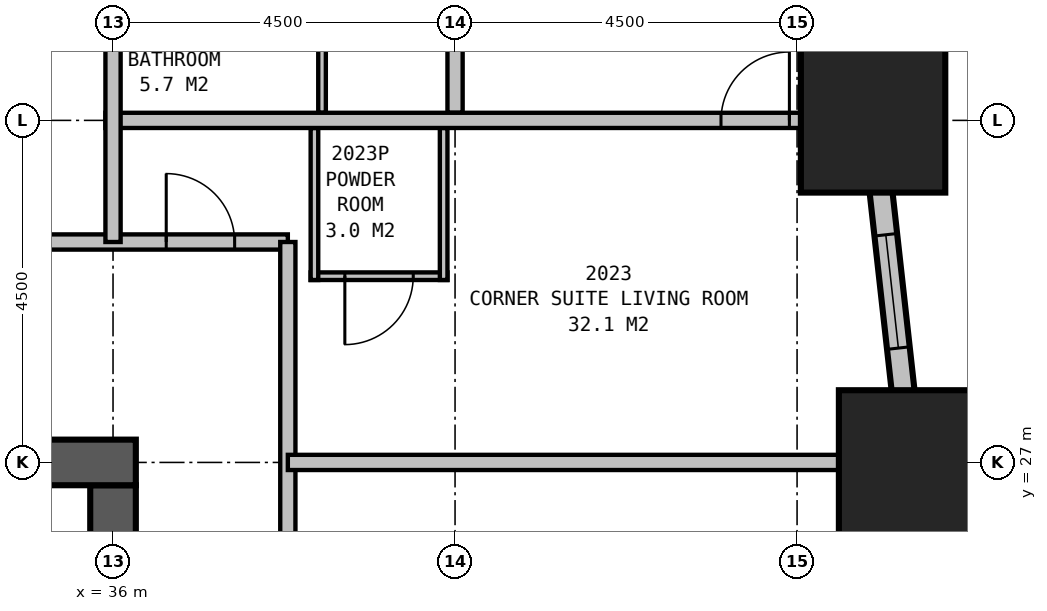
"""IFC4 building model, lengths in metres.
Left out: names, types, materials, properties, quantities, classifications, styles, units other than length and angle.
Written with IfcOpenShell. Run it as: python <this file> out.ifc"""

import sys

from ifc_helpers import new_model, si_unit, direction, frame, frame_2d, origin, origin_2d, place, context, subcontext, project, spatial, rectangle, extrude, element, fill, save


model = new_model("IFC4")
c1 = context("Model", 3, precision=1e-05, world=origin(), true_north=direction((0.0, 1.0)))
c2 = subcontext(c1, "Body", "Model", "MODEL_VIEW")
j1 = project(units=[si_unit("LENGTHUNIT", "METRE"), si_unit("PLANEANGLEUNIT", "RADIAN")], contexts=[c1])
p1 = place(None, origin())
s1 = spatial("IfcSite", under=j1, at=p1, CompositionType="ELEMENT")
p2 = place(p1, origin())
s2 = spatial("IfcBuilding", under=s1, at=p2, CompositionType="ELEMENT")
p3 = place(p2, frame((0.0, 0.0, 82.2)))
s3 = spatial("IfcBuildingStorey", under=s2, at=p3, CompositionType="ELEMENT", Elevation=82.2)
for number, where, z_axis, x_axis in (
    (1, (46.5, 27.0, 0.0), (0.0, 0.0, 1.0), (1.0, 0.0, 0.0)),
    (2, (46.0, 31.5, 0.0), (0.0, 0.0, 1.0), (1.0, 0.0, 0.0)),
):
    element("IfcColumn", number, at=place(p3, frame(where, z_axis=z_axis, x_axis=x_axis)), inside=s3, PredefinedType="COLUMN", context=c2, shape_type="SweptSolid", body=[
        extrude(rectangle(XDim=1.9, YDim=1.9, at=origin_2d()), origin(), (0.0, 0.0, 1.0), 3.5),
    ])
p4 = place(p3, frame((36.3, 27.0, 0.0), z_axis=(0.0, 0.0, 1.0), x_axis=(-1.0, 0.0, 0.0)))
e3 = element("IfcWall", 3, at=p4, inside=s3, PredefinedType="SHEAR", context=c2, shape_type="SweptSolid", body=[
    extrude(rectangle(XDim=23.1, YDim=0.6, at=frame_2d((11.55, 0.0))), origin(), (0.0, 0.0, 1.0), 3.5),
])
p5 = place(p4, frame((17.05, 0.0, 0.0)))
e4 = element("IfcOpeningElement", 4, at=p5, cuts=e3, PredefinedType="OPENING", context=c2, shape_type="SweptSolid", body=[
    extrude(rectangle(XDim=1.0, YDim=2.1, at=frame_2d((0.5, 1.05))), frame((0.0, 0.31, 0.0), z_axis=(0.0, -1.0, 0.0), x_axis=(1.0, 0.0, 0.0)), (0.0, 0.0, 1.0), 0.62),
])
p6 = place(p4, frame((12.05, 0.0, 0.0)))
e5 = element("IfcOpeningElement", 5, at=p6, cuts=e3, PredefinedType="OPENING", context=c2, shape_type="SweptSolid", body=[
    extrude(rectangle(XDim=1.0, YDim=2.1, at=frame_2d((0.5, 1.05))), frame((0.0, 0.31, 0.0), z_axis=(0.0, -1.0, 0.0), x_axis=(1.0, 0.0, 0.0)), (0.0, 0.0, 1.0), 0.62),
])
p7 = place(p4, frame((7.05, 0.0, 0.0)))
e6 = element("IfcOpeningElement", 6, at=p7, cuts=e3, PredefinedType="OPENING", context=c2, shape_type="SweptSolid", body=[
    extrude(rectangle(XDim=1.0, YDim=2.1, at=frame_2d((0.5, 1.05))), frame((0.0, 0.31, 0.0), z_axis=(0.0, -1.0, 0.0), x_axis=(1.0, 0.0, 0.0)), (0.0, 0.0, 1.0), 0.62),
])
p8 = place(p3, frame((36.0, 20.0, 0.0), z_axis=(0.0, 0.0, 1.0), x_axis=(0.0, 1.0, 0.0)))
e7 = element("IfcWall", 7, at=p8, inside=s3, PredefinedType="SHEAR", context=c2, shape_type="SweptSolid", body=[
    extrude(rectangle(XDim=6.7, YDim=0.6, at=frame_2d((3.35, 0.0))), origin(), (0.0, 0.0, 1.0), 3.5),
])
p9 = place(p3, frame((49.017, 4.351, 0.0), z_axis=(0.0, 0.0, 1.0), x_axis=(-0.110433201132, 0.993883548555, 0.0)))
e8 = element("IfcWall", 8, at=p9, inside=s3, PredefinedType="STANDARD", context=c2, shape_type="SweptSolid", body=[
    extrude(rectangle(XDim=31.994, YDim=0.3, at=frame_2d((15.997, 0.0))), origin(), (0.0, 0.0, 1.0), 2.1),
])
p10 = place(p9, frame((1.664, 0.0, 0.5)))
e9 = element("IfcOpeningElement", 9, at=p10, cuts=e8, PredefinedType="OPENING", context=c2, shape_type="SweptSolid", body=[
    extrude(rectangle(XDim=1.5, YDim=1.4, at=frame_2d((0.75, 0.7))), frame((0.0, 0.16, 0.0), z_axis=(0.0, -1.0, 0.0), x_axis=(1.0, 0.0, 0.0)), (0.0, 0.0, 1.0), 0.32),
])
p11 = place(p9, frame((6.192, 0.0, 0.5)))
e10 = element("IfcOpeningElement", 10, at=p11, cuts=e8, PredefinedType="OPENING", context=c2, shape_type="SweptSolid", body=[
    extrude(rectangle(XDim=1.5, YDim=1.4, at=frame_2d((0.75, 0.7))), frame((0.0, 0.16, 0.0), z_axis=(0.0, -1.0, 0.0), x_axis=(1.0, 0.0, 0.0)), (0.0, 0.0, 1.0), 0.32),
])
p12 = place(p9, frame((10.719, 0.0, 0.5)))
e11 = element("IfcOpeningElement", 11, at=p12, cuts=e8, PredefinedType="OPENING", context=c2, shape_type="SweptSolid", body=[
    extrude(rectangle(XDim=1.5, YDim=1.4, at=frame_2d((0.75, 0.7))), frame((0.0, 0.16, 0.0), z_axis=(0.0, -1.0, 0.0), x_axis=(1.0, 0.0, 0.0)), (0.0, 0.0, 1.0), 0.32),
])
p13 = place(p9, frame((15.247, 0.0, 0.5)))
e12 = element("IfcOpeningElement", 12, at=p13, cuts=e8, PredefinedType="OPENING", context=c2, shape_type="SweptSolid", body=[
    extrude(rectangle(XDim=1.5, YDim=1.4, at=frame_2d((0.75, 0.7))), frame((0.0, 0.16, 0.0), z_axis=(0.0, -1.0, 0.0), x_axis=(1.0, 0.0, 0.0)), (0.0, 0.0, 1.0), 0.32),
])
p14 = place(p9, frame((19.775, 0.0, 0.5)))
e13 = element("IfcOpeningElement", 13, at=p14, cuts=e8, PredefinedType="OPENING", context=c2, shape_type="SweptSolid", body=[
    extrude(rectangle(XDim=1.5, YDim=1.4, at=frame_2d((0.75, 0.7))), frame((0.0, 0.16, 0.0), z_axis=(0.0, -1.0, 0.0), x_axis=(1.0, 0.0, 0.0)), (0.0, 0.0, 1.0), 0.32),
])
p15 = place(p9, frame((24.302, 0.0, 0.5)))
e14 = element("IfcOpeningElement", 14, at=p15, cuts=e8, PredefinedType="OPENING", context=c2, shape_type="SweptSolid", body=[
    extrude(rectangle(XDim=1.5, YDim=1.4, at=frame_2d((0.75, 0.7))), frame((0.0, 0.16, 0.0), z_axis=(0.0, -1.0, 0.0), x_axis=(1.0, 0.0, 0.0)), (0.0, 0.0, 1.0), 0.32),
])
p16 = place(p9, frame((28.83, 0.0, 0.5)))
e15 = element("IfcOpeningElement", 15, at=p16, cuts=e8, PredefinedType="OPENING", context=c2, shape_type="SweptSolid", body=[
    extrude(rectangle(XDim=1.5, YDim=1.4, at=frame_2d((0.75, 0.7))), frame((0.0, 0.16, 0.0), z_axis=(0.0, -1.0, 0.0), x_axis=(1.0, 0.0, 0.0)), (0.0, 0.0, 1.0), 0.32),
])
p17 = place(p3, frame((11.2, 29.9, 0.0), z_axis=(0.0, 0.0, 1.0), x_axis=(1.0, 0.0, 0.0)))
e16 = element("IfcWall", 16, at=p17, inside=s3, PredefinedType="PARTITIONING", context=c2, shape_type="SweptSolid", body=[
    extrude(rectangle(XDim=27.1, YDim=0.2, at=frame_2d((13.55, 0.0))), origin(), (0.0, 0.0, 1.0), 3.25),
])
p18 = place(p17, frame((5.05, 0.0, 0.0)))
e17 = element("IfcOpeningElement", 17, at=p18, cuts=e16, PredefinedType="OPENING", context=c2, shape_type="SweptSolid", body=[
    extrude(rectangle(XDim=0.9, YDim=2.1, at=frame_2d((0.45, 1.05))), frame((0.0, 0.11, 0.0), z_axis=(0.0, -1.0, 0.0), x_axis=(1.0, 0.0, 0.0)), (0.0, 0.0, 1.0), 0.22),
])
p19 = place(p17, frame((7.65, 0.0, 0.0)))
e18 = element("IfcOpeningElement", 18, at=p19, cuts=e16, PredefinedType="OPENING", context=c2, shape_type="SweptSolid", body=[
    extrude(rectangle(XDim=0.9, YDim=2.1, at=frame_2d((0.45, 1.05))), frame((0.0, 0.11, 0.0), z_axis=(0.0, -1.0, 0.0), x_axis=(1.0, 0.0, 0.0)), (0.0, 0.0, 1.0), 0.22),
])
p20 = place(p17, frame((12.0, 0.0, 0.0)))
e19 = element("IfcOpeningElement", 19, at=p20, cuts=e16, PredefinedType="OPENING", context=c2, shape_type="SweptSolid", body=[
    extrude(rectangle(XDim=1.0, YDim=2.1, at=frame_2d((0.5, 1.05))), frame((0.0, 0.11, 0.0), z_axis=(0.0, -1.0, 0.0), x_axis=(1.0, 0.0, 0.0)), (0.0, 0.0, 1.0), 0.22),
])
p21 = place(p17, frame((17.45, 0.0, 0.0)))
e20 = element("IfcOpeningElement", 20, at=p21, cuts=e16, PredefinedType="OPENING", context=c2, shape_type="SweptSolid", body=[
    extrude(rectangle(XDim=0.9, YDim=2.1, at=frame_2d((0.45, 1.05))), frame((0.0, 0.11, 0.0), z_axis=(0.0, -1.0, 0.0), x_axis=(1.0, 0.0, 0.0)), (0.0, 0.0, 1.0), 0.22),
])
p22 = place(p17, frame((21.8, 0.0, 0.0)))
e21 = element("IfcOpeningElement", 21, at=p22, cuts=e16, PredefinedType="OPENING", context=c2, shape_type="SweptSolid", body=[
    extrude(rectangle(XDim=0.9, YDim=2.1, at=frame_2d((0.45, 1.05))), frame((0.0, 0.11, 0.0), z_axis=(0.0, -1.0, 0.0), x_axis=(1.0, 0.0, 0.0)), (0.0, 0.0, 1.0), 0.22),
])
p23 = place(p17, frame((25.5, 0.0, 0.0)))
e22 = element("IfcOpeningElement", 22, at=p23, cuts=e16, PredefinedType="OPENING", context=c2, shape_type="SweptSolid", body=[
    extrude(rectangle(XDim=0.9, YDim=2.1, at=frame_2d((0.45, 1.05))), frame((0.0, 0.11, 0.0), z_axis=(0.0, -1.0, 0.0), x_axis=(1.0, 0.0, 0.0)), (0.0, 0.0, 1.0), 0.22),
])
p24 = place(p17, frame((0.7, 0.0, 0.0)))
e23 = element("IfcOpeningElement", 23, at=p24, cuts=e16, PredefinedType="OPENING", context=c2, shape_type="SweptSolid", body=[
    extrude(rectangle(XDim=0.9, YDim=2.1, at=frame_2d((0.45, 1.05))), frame((0.0, 0.11, 0.0), z_axis=(0.0, -1.0, 0.0), x_axis=(1.0, 0.0, 0.0)), (0.0, 0.0, 1.0), 0.22),
])
p25 = place(p3, frame((38.3, 11.2, 0.0), z_axis=(0.0, 0.0, 1.0), x_axis=(0.0, 1.0, 0.0)))
e24 = element("IfcWall", 24, at=p25, inside=s3, PredefinedType="PARTITIONING", context=c2, shape_type="SweptSolid", body=[
    extrude(rectangle(XDim=18.7, YDim=0.2, at=frame_2d((9.35, 0.0))), origin(), (0.0, 0.0, 1.0), 3.25),
])
p26 = place(p25, frame((6.45, 0.0, 0.0), z_axis=(0.0, 0.0, 1.0), x_axis=(-1.0, 0.0, 0.0)))
e25 = element("IfcOpeningElement", 25, at=p26, cuts=e24, PredefinedType="OPENING", context=c2, shape_type="SweptSolid", body=[
    extrude(rectangle(XDim=1.0, YDim=2.1, at=frame_2d((0.5, 1.05))), frame((0.0, 0.11, 0.0), z_axis=(0.0, -1.0, 0.0), x_axis=(1.0, 0.0, 0.0)), (0.0, 0.0, 1.0), 0.22),
])
p27 = place(p25, frame((8.0, 0.0, 0.0), z_axis=(0.0, 0.0, 1.0), x_axis=(-1.0, 0.0, 0.0)))
e26 = element("IfcOpeningElement", 26, at=p27, cuts=e24, PredefinedType="OPENING", context=c2, shape_type="SweptSolid", body=[
    extrude(rectangle(XDim=0.9, YDim=2.1, at=frame_2d((0.45, 1.05))), frame((0.0, 0.11, 0.0), z_axis=(0.0, -1.0, 0.0), x_axis=(1.0, 0.0, 0.0)), (0.0, 0.0, 1.0), 0.22),
])
p28 = place(p3, frame((38.3, 27.0, 0.0), z_axis=(0.0, 0.0, 1.0), x_axis=(1.0, 0.0, 0.0)))
e27 = element("IfcWall", 27, at=p28, inside=s3, PredefinedType="PARTITIONING", context=c2, shape_type="SweptSolid", body=[
    extrude(rectangle(XDim=7.977, YDim=0.2, at=frame_2d((3.988, 0.0))), origin(), (0.0, 0.0, 1.0), 1.9),
])
p29 = place(p3, frame((36.0, 29.9, 0.0), z_axis=(0.0, 0.0, 1.0), x_axis=(0.0, 1.0, 0.0)))
e28 = element("IfcWall", 28, at=p29, inside=s3, PredefinedType="PARTITIONING", context=c2, shape_type="SweptSolid", body=[
    extrude(rectangle(XDim=10.6, YDim=0.2, at=frame_2d((5.3, 0.0))), origin(), (0.0, 0.0, 1.0), 2.2),
])
p30 = place(p3, frame((35.9, 31.5, 0.0), z_axis=(0.0, 0.0, 1.0), x_axis=(1.0, 0.0, 0.0)))
e29 = element("IfcWall", 29, at=p30, inside=s3, PredefinedType="PARTITIONING", context=c2, shape_type="SweptSolid", body=[
    extrude(rectangle(XDim=10.099, YDim=0.2, at=frame_2d((5.05, 0.0))), origin(), (0.0, 0.0, 1.0), 3.25),
])
p31 = place(p30, frame((8.099, 0.0, 0.0)))
e30 = element("IfcOpeningElement", 30, at=p31, cuts=e29, PredefinedType="OPENING", context=c2, shape_type="SweptSolid", body=[
    extrude(rectangle(XDim=0.9, YDim=2.1, at=frame_2d((0.45, 1.05))), frame((0.0, 0.11, 0.0), z_axis=(0.0, -1.0, 0.0), x_axis=(1.0, 0.0, 0.0)), (0.0, 0.0, 1.0), 0.22),
])
p32 = place(p3, frame((40.35, 31.4, 0.0), z_axis=(0.0, 0.0, 1.0), x_axis=(0.0, -1.0, 0.0)))
e31 = element("IfcWall", 31, at=p32, inside=s3, PredefinedType="PLUMBINGWALL", context=c2, shape_type="SweptSolid", body=[
    extrude(rectangle(XDim=2.0, YDim=0.1, at=frame_2d((1.0, 0.0))), origin(), (0.0, 0.0, 1.0), 2.2),
])
p33 = place(p3, frame((38.65, 31.4, 0.0), z_axis=(0.0, 0.0, 1.0), x_axis=(0.0, -1.0, 0.0)))
e32 = element("IfcWall", 32, at=p33, inside=s3, PredefinedType="PLUMBINGWALL", context=c2, shape_type="SweptSolid", body=[
    extrude(rectangle(XDim=2.0, YDim=0.1, at=frame_2d((1.0, 0.0))), origin(), (0.0, 0.0, 1.0), 3.25),
])
p34 = place(p3, frame((38.6, 29.45, 0.0), z_axis=(0.0, 0.0, 1.0), x_axis=(1.0, 0.0, 0.0)))
e33 = element("IfcWall", 33, at=p34, inside=s3, PredefinedType="PLUMBINGWALL", context=c2, shape_type="SweptSolid", body=[
    extrude(rectangle(XDim=1.8, YDim=0.1, at=frame_2d((0.9, 0.0))), origin(), (0.0, 0.0, 1.0), 3.25),
])
p35 = place(p34, frame((1.35, 0.0, 0.0), z_axis=(0.0, 0.0, 1.0), x_axis=(-1.0, 0.0, 0.0)))
e34 = element("IfcOpeningElement", 34, at=p35, cuts=e33, PredefinedType="OPENING", context=c2, shape_type="SweptSolid", body=[
    extrude(rectangle(XDim=0.9, YDim=2.1, at=frame_2d((0.45, 1.05))), frame((0.0, 0.06, 0.0), z_axis=(0.0, -1.0, 0.0), x_axis=(1.0, 0.0, 0.0)), (0.0, 0.0, 1.0), 0.12),
])
p36 = place(p3, frame((40.5, 31.6, 0.0), z_axis=(0.0, 0.0, 1.0), x_axis=(0.0, 1.0, 0.0)))
e35 = element("IfcWall", 35, at=p36, inside=s3, PredefinedType="PARTITIONING", context=c2, shape_type="SweptSolid", body=[
    extrude(rectangle(XDim=4.4, YDim=0.2, at=frame_2d((2.2, 0.0))), origin(), (0.0, 0.0, 1.0), 2.2),
])
p37 = place(p36, frame((2.4, 0.0, 0.0)))
e36 = element("IfcOpeningElement", 36, at=p37, cuts=e35, PredefinedType="OPENING", context=c2, shape_type="SweptSolid", body=[
    extrude(rectangle(XDim=0.9, YDim=2.1, at=frame_2d((0.45, 1.05))), frame((0.0, 0.11, 0.0), z_axis=(0.0, -1.0, 0.0), x_axis=(1.0, 0.0, 0.0)), (0.0, 0.0, 1.0), 0.22),
])
p38 = place(p3, frame((38.75, 31.6, 0.0), z_axis=(0.0, 0.0, 1.0), x_axis=(0.0, 1.0, 0.0)))
e37 = element("IfcWall", 37, at=p38, inside=s3, PredefinedType="PLUMBINGWALL", context=c2, shape_type="SweptSolid", body=[
    extrude(rectangle(XDim=2.3, YDim=0.1, at=frame_2d((1.15, 0.0))), origin(), (0.0, 0.0, 1.0), 3.25),
])
p39 = place(p15, origin())
e38 = element("IfcWindow", 38, at=p39, inside=s3, PartitioningType="SINGLE_PANEL", PredefinedType="WINDOW", context=c2, shape_type="SweptSolid", body=[
    extrude(rectangle(XDim=1.5, YDim=1.4, at=frame_2d((0.75, 0.7))), frame((0.0, 0.03, 0.0), z_axis=(0.0, -1.0, 0.0), x_axis=(1.0, 0.0, 0.0)), (0.0, 0.0, 1.0), 0.06),
])
fill(e14, e38)
p40 = place(p23, origin())
e39 = element("IfcDoor", 39, at=p40, inside=s3, OperationType="SINGLE_SWING_LEFT", PredefinedType="DOOR", context=c2, shape_type="SweptSolid", body=[
    extrude(rectangle(XDim=0.9, YDim=2.1, at=frame_2d((0.45, 1.05))), frame((0.0, 0.025, 0.0), z_axis=(0.0, -1.0, 0.0), x_axis=(1.0, 0.0, 0.0)), (0.0, 0.0, 1.0), 0.05),
])
fill(e22, e39)
p41 = place(p31, origin())
e40 = element("IfcDoor", 40, at=p41, inside=s3, OperationType="SINGLE_SWING_RIGHT", PredefinedType="DOOR", context=c2, shape_type="SweptSolid", body=[
    extrude(rectangle(XDim=0.9, YDim=2.1, at=frame_2d((0.45, 1.05))), frame((0.0, 0.025, 0.0), z_axis=(0.0, -1.0, 0.0), x_axis=(1.0, 0.0, 0.0)), (0.0, 0.0, 1.0), 0.05),
])
fill(e30, e40)
p42 = place(p35, origin())
e41 = element("IfcDoor", 41, at=p42, inside=s3, OperationType="SINGLE_SWING_RIGHT", PredefinedType="DOOR", context=c2, shape_type="SweptSolid", body=[
    extrude(rectangle(XDim=0.9, YDim=2.1, at=frame_2d((0.45, 1.05))), frame((0.0, 0.025, 0.0), z_axis=(0.0, -1.0, 0.0), x_axis=(1.0, 0.0, 0.0)), (0.0, 0.0, 1.0), 0.05),
])
fill(e34, e41)
save(model, sys.argv[1])
